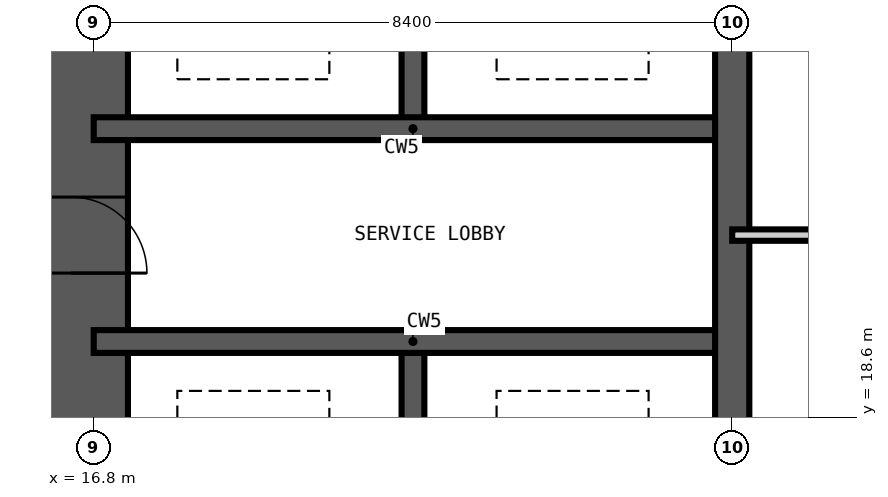
"""IFC4 building model, lengths in metres.
Left out: names, types, materials, properties, quantities, classifications, styles, units other than length and angle.
Written with IfcOpenShell. Run it as: python <this file> out.ifc"""

import sys

from ifc_helpers import new_model, si_unit, direction, frame, frame_2d, origin, place, context, subcontext, project, spatial, rectangle, extrude, element, fill, save


model = new_model("IFC4")
c1 = context("Model", 3, precision=1e-05, world=origin(), true_north=direction((0.0, 1.0)))
c2 = subcontext(c1, "Body", "Model", "MODEL_VIEW")
j1 = project(units=[si_unit("LENGTHUNIT", "METRE"), si_unit("PLANEANGLEUNIT", "RADIAN")], contexts=[c1])
p1 = place(None, origin())
s1 = spatial("IfcSite", under=j1, at=p1, CompositionType="ELEMENT")
p2 = place(p1, origin())
s2 = spatial("IfcBuilding", under=s1, at=p2, CompositionType="ELEMENT")
p3 = place(p2, frame((0.0, 0.0, 70.2)))
s3 = spatial("IfcBuildingStorey", under=s2, at=p3, CompositionType="ELEMENT", Elevation=70.2)
p4 = place(p3, frame((16.5, 41.55, -0.35), z_axis=(0.0, 0.0, 1.0), x_axis=(0.0, -1.0, 0.0)))
e1 = element("IfcWall", 1, at=p4, inside=s3, PredefinedType="SHEAR", context=c2, shape_type="SweptSolid", body=[
    extrude(rectangle(XDim=24.3, YDim=1.5, at=frame_2d((12.15, 0.0))), origin(), (0.0, 0.0, 1.0), 3.6),
])
p5 = place(p4, frame((11.25, 0.0, 0.35)))
e2 = element("IfcOpeningElement", 2, at=p5, cuts=e1, PredefinedType="OPENING", context=c2, shape_type="SweptSolid", body=[
    extrude(rectangle(XDim=1.8, YDim=2.2, at=frame_2d((0.9, 1.1))), frame((0.0, 0.76, 0.0), z_axis=(0.0, -1.0, 0.0), x_axis=(1.0, 0.0, 0.0)), (0.0, 0.0, 1.0), 1.52),
])
p6 = place(p4, frame((20.05, 0.0, 0.35)))
e3 = element("IfcOpeningElement", 3, at=p6, cuts=e1, PredefinedType="OPENING", context=c2, shape_type="SweptSolid", body=[
    extrude(rectangle(XDim=1.0, YDim=2.1, at=frame_2d((0.5, 1.05))), frame((0.0, 0.76, 0.0), z_axis=(0.0, -1.0, 0.0), x_axis=(1.0, 0.0, 0.0)), (0.0, 0.0, 1.0), 1.52),
])
p7 = place(p4, frame((5.35, 0.0, 0.35)))
e4 = element("IfcOpeningElement", 4, at=p7, cuts=e1, PredefinedType="OPENING", context=c2, shape_type="SweptSolid", body=[
    extrude(rectangle(XDim=1.0, YDim=2.1, at=frame_2d((0.5, 1.05))), frame((0.0, 0.76, 0.0), z_axis=(0.0, -1.0, 0.0), x_axis=(1.0, 0.0, 0.0)), (0.0, 0.0, 1.0), 1.52),
])
p8 = place(p3, frame((21.0, 16.8, -0.35), z_axis=(0.0, 0.0, 1.0), x_axis=(0.0, 1.0, 0.0)))
e5 = element("IfcWall", 5, at=p8, inside=s3, PredefinedType="SHEAR", context=c2, shape_type="SweptSolid", body=[
    extrude(rectangle(XDim=2.8, YDim=0.3, at=frame_2d((1.4, 0.0))), origin(), (0.0, 0.0, 1.0), 3.6),
])
p9 = place(p3, frame((21.0, 22.4, -0.35), z_axis=(0.0, 0.0, 1.0), x_axis=(0.0, 1.0, 0.0)))
e6 = element("IfcWall", 6, at=p9, inside=s3, PredefinedType="SHEAR", context=c2, shape_type="SweptSolid", body=[
    extrude(rectangle(XDim=5.6, YDim=0.3, at=frame_2d((2.8, 0.0))), origin(), (0.0, 0.0, 1.0), 3.6),
])
for number, where, z_axis, x_axis in (
    (7, (16.8, 19.6, -0.35), (0.0, 0.0, 1.0), (1.0, 0.0, 0.0)),
    (8, (16.8, 22.4, -0.35), (0.0, 0.0, 1.0), (1.0, 0.0, 0.0)),
):
    element("IfcWall", number, at=place(p3, frame(where, z_axis=z_axis, x_axis=x_axis)), inside=s3, PredefinedType="SHEAR", context=c2, shape_type="SweptSolid", body=[
        extrude(rectangle(XDim=8.4, YDim=0.3, at=frame_2d((4.2, 0.0))), origin(), (0.0, 0.0, 1.0), 3.6),
    ])
p10 = place(p3, frame((25.2, 16.8, -0.35), z_axis=(0.0, 0.0, 1.0), x_axis=(0.0, 1.0, 0.0)))
e9 = element("IfcWall", 9, at=p10, inside=s3, PredefinedType="SHEAR", context=c2, shape_type="SweptSolid", body=[
    extrude(rectangle(XDim=25.2, YDim=0.45, at=frame_2d((12.6, 0.0))), origin(), (0.0, 0.0, 1.0), 3.6),
])
p11 = place(p3, frame((25.2, 21.0, 0.0), z_axis=(0.0, 0.0, 1.0), x_axis=(1.0, 0.0, 0.0)))
e10 = element("IfcWall", 10, at=p11, inside=s3, PredefinedType="PARTITIONING", context=c2, shape_type="SweptSolid", body=[
    extrude(rectangle(XDim=8.4, YDim=0.15, at=frame_2d((4.2, 0.0))), origin(), (0.0, 0.0, 1.0), 3.25),
])
p12 = place(p11, frame((3.7, 0.0, 0.0)))
e11 = element("IfcOpeningElement", 11, at=p12, cuts=e10, PredefinedType="OPENING", context=c2, shape_type="SweptSolid", body=[
    extrude(rectangle(XDim=1.0, YDim=2.1, at=frame_2d((0.5, 1.05))), frame((0.0, 0.085, 0.0), z_axis=(0.0, -1.0, 0.0), x_axis=(1.0, 0.0, 0.0)), (0.0, 0.0, 1.0), 0.17),
])
p13 = place(p6, origin())
e12 = element("IfcDoor", 12, at=p13, inside=s3, OperationType="SINGLE_SWING_RIGHT", PredefinedType="DOOR", context=c2, shape_type="SweptSolid", body=[
    extrude(rectangle(XDim=1.0, YDim=2.1, at=frame_2d((0.5, 1.05))), frame((0.0, 0.025, 0.0), z_axis=(0.0, -1.0, 0.0), x_axis=(1.0, 0.0, 0.0)), (0.0, 0.0, 1.0), 0.05),
])
fill(e3, e12)
save(model, sys.argv[1])
